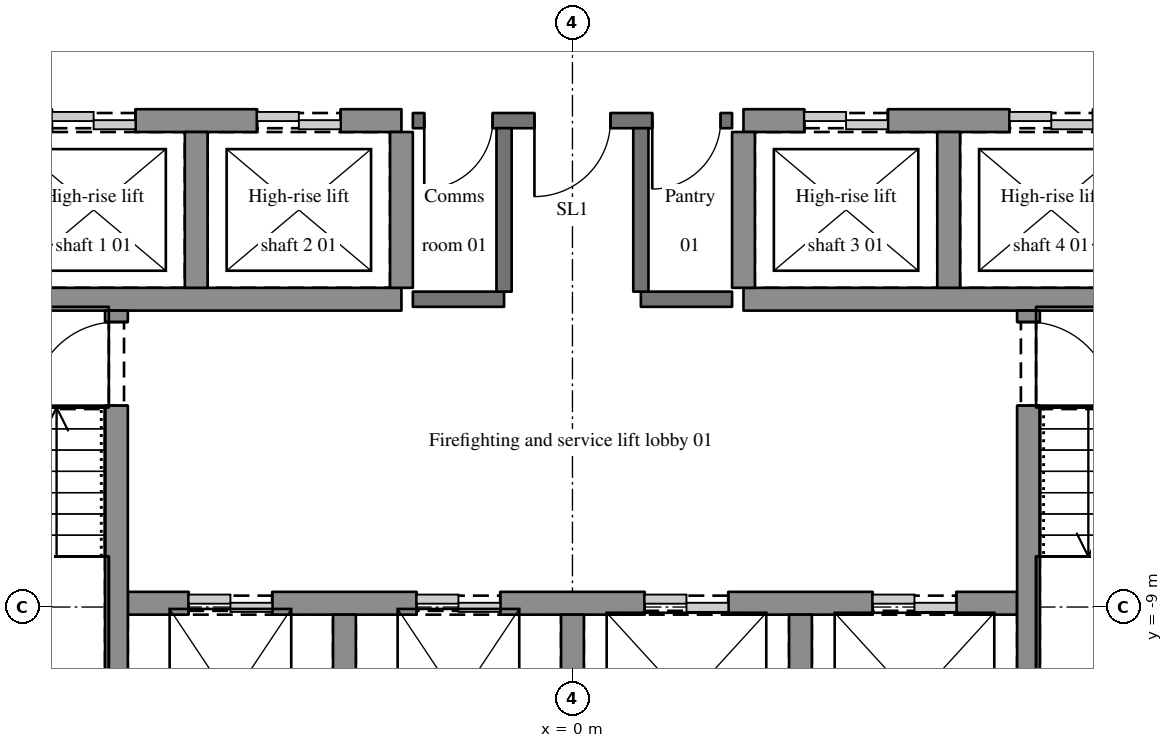
"""IFC4 building model, lengths in metres.
Left out: names, types, materials, properties, quantities, classifications, styles, units other than length and angle.
Written with IfcOpenShell. Run it as: python <this file> out.ifc"""

import sys

from ifc_helpers import new_model, si_unit, direction, frame, frame_2d, origin, place, context, subcontext, project, spatial, rectangle, extrude, element, fill, save


model = new_model("IFC4")
c1 = context("Model", 3, precision=1e-05, world=origin(), true_north=direction((0.0, 1.0)))
c2 = subcontext(c1, "Body", "Model", "MODEL_VIEW")
j1 = project(units=[si_unit("LENGTHUNIT", "METRE"), si_unit("PLANEANGLEUNIT", "RADIAN")], contexts=[c1])
p1 = place(None, origin())
s1 = spatial("IfcSite", under=j1, at=p1, CompositionType="ELEMENT")
p2 = place(p1, origin())
s2 = spatial("IfcBuilding", under=s1, at=p2, CompositionType="ELEMENT")
p3 = place(p2, frame((0.0, 0.0, 162.3)))
s3 = spatial("IfcBuildingStorey", under=s2, at=p3, CompositionType="ELEMENT", Elevation=162.3)
p4 = place(p3, frame((-5.85, -8.95, 0.0), z_axis=(0.0, 0.0, 1.0), x_axis=(1.0, 0.0, 0.0)))
e1 = element("IfcWall", 1, at=p4, inside=s3, PredefinedType="SHEAR", context=c2, shape_type="SweptSolid", body=[
    extrude(rectangle(XDim=11.7, YDim=0.3, at=frame_2d((5.85, 0.0))), origin(), (0.0, 0.0, 1.0), 5.4),
])
p5 = place(p4, frame((0.8, 0.0, 0.0)))
e2 = element("IfcOpeningElement", 2, at=p5, cuts=e1, PredefinedType="OPENING", context=c2, shape_type="SweptSolid", body=[
    extrude(rectangle(XDim=1.1, YDim=2.1, at=frame_2d((0.55, 1.05))), frame((0.0, 0.16, 0.0), z_axis=(0.0, -1.0, 0.0), x_axis=(1.0, 0.0, 0.0)), (0.0, 0.0, 1.0), 0.32),
])
p6 = place(p4, frame((3.8, 0.0, 0.0)))
e3 = element("IfcOpeningElement", 3, at=p6, cuts=e1, PredefinedType="OPENING", context=c2, shape_type="SweptSolid", body=[
    extrude(rectangle(XDim=1.1, YDim=2.1, at=frame_2d((0.55, 1.05))), frame((0.0, 0.16, 0.0), z_axis=(0.0, -1.0, 0.0), x_axis=(1.0, 0.0, 0.0)), (0.0, 0.0, 1.0), 0.32),
])
p7 = place(p4, frame((6.8, 0.0, 0.0)))
e4 = element("IfcOpeningElement", 4, at=p7, cuts=e1, PredefinedType="OPENING", context=c2, shape_type="SweptSolid", body=[
    extrude(rectangle(XDim=1.1, YDim=2.1, at=frame_2d((0.55, 1.05))), frame((0.0, 0.16, 0.0), z_axis=(0.0, -1.0, 0.0), x_axis=(1.0, 0.0, 0.0)), (0.0, 0.0, 1.0), 0.32),
])
p8 = place(p4, frame((9.8, 0.0, 0.0)))
e5 = element("IfcOpeningElement", 5, at=p8, cuts=e1, PredefinedType="OPENING", context=c2, shape_type="SweptSolid", body=[
    extrude(rectangle(XDim=1.1, YDim=2.1, at=frame_2d((0.55, 1.05))), frame((0.0, 0.16, 0.0), z_axis=(0.0, -1.0, 0.0), x_axis=(1.0, 0.0, 0.0)), (0.0, 0.0, 1.0), 0.32),
])
p9 = place(p3, frame((-9.0, -4.95, 0.0), z_axis=(0.0, 0.0, 1.0), x_axis=(1.0, 0.0, 0.0)))
e6 = element("IfcWall", 6, at=p9, inside=s3, PredefinedType="SHEAR", context=c2, shape_type="SweptSolid", body=[
    extrude(rectangle(XDim=6.75, YDim=0.3, at=frame_2d((3.375, 0.0))), origin(), (0.0, 0.0, 1.0), 5.4),
])
for number, where, z_axis, x_axis in (
    (7, (-2.1, -4.95, 0.0), (0.0, 0.0, 1.0), (1.0, 0.0, 0.0)),
    (8, (0.9, -4.95, 0.0), (0.0, 0.0, 1.0), (1.0, 0.0, 0.0)),
):
    element("IfcWall", number, at=place(p3, frame(where, z_axis=z_axis, x_axis=x_axis)), inside=s3, PredefinedType="SOLIDWALL", context=c2, shape_type="SweptSolid", body=[
        extrude(rectangle(XDim=1.2, YDim=0.2, at=frame_2d((0.6, 0.0))), origin(), (0.0, 0.0, 1.0), 5.1),
    ])
p10 = place(p3, frame((2.25, -4.95, 0.0), z_axis=(0.0, 0.0, 1.0), x_axis=(1.0, 0.0, 0.0)))
e9 = element("IfcWall", 9, at=p10, inside=s3, PredefinedType="SHEAR", context=c2, shape_type="SweptSolid", body=[
    extrude(rectangle(XDim=6.75, YDim=0.3, at=frame_2d((3.375, 0.0))), origin(), (0.0, 0.0, 1.0), 5.4),
])
p11 = place(p3, frame((-7.65, -2.6, 0.0), z_axis=(0.0, 0.0, 1.0), x_axis=(1.0, 0.0, 0.0)))
e10 = element("IfcWall", 10, at=p11, inside=s3, PredefinedType="SHEAR", context=c2, shape_type="SweptSolid", body=[
    extrude(rectangle(XDim=5.4, YDim=0.3, at=frame_2d((2.7, 0.0))), origin(), (0.0, 0.0, 1.0), 5.4),
])
p12 = place(p11, frame((0.8, 0.0, 0.0)))
e11 = element("IfcOpeningElement", 11, at=p12, cuts=e10, PredefinedType="OPENING", context=c2, shape_type="SweptSolid", body=[
    extrude(rectangle(XDim=1.1, YDim=2.1, at=frame_2d((0.55, 1.05))), frame((0.0, 0.16, 0.0), z_axis=(0.0, -1.0, 0.0), x_axis=(1.0, 0.0, 0.0)), (0.0, 0.0, 1.0), 0.32),
])
p13 = place(p11, frame((3.5, 0.0, 0.0)))
e12 = element("IfcOpeningElement", 12, at=p13, cuts=e10, PredefinedType="OPENING", context=c2, shape_type="SweptSolid", body=[
    extrude(rectangle(XDim=1.1, YDim=2.1, at=frame_2d((0.55, 1.05))), frame((0.0, 0.16, 0.0), z_axis=(0.0, -1.0, 0.0), x_axis=(1.0, 0.0, 0.0)), (0.0, 0.0, 1.0), 0.32),
])
p14 = place(p3, frame((2.1, -2.6, 0.0), z_axis=(0.0, 0.0, 1.0), x_axis=(-1.0, 0.0, 0.0)))
e13 = element("IfcWall", 13, at=p14, inside=s3, PredefinedType="SOLIDWALL", context=c2, shape_type="SweptSolid", body=[
    extrude(rectangle(XDim=4.2, YDim=0.2, at=frame_2d((2.1, 0.0))), origin(), (0.0, 0.0, 1.0), 5.1),
])
p15 = place(p14, frame((1.6, 0.0, 0.0)))
e14 = element("IfcOpeningElement", 14, at=p15, cuts=e13, PredefinedType="OPENING", context=c2, shape_type="SweptSolid", body=[
    extrude(rectangle(XDim=1.0, YDim=2.1, at=frame_2d((0.5, 1.05))), frame((0.0, 0.11, 0.0), z_axis=(0.0, -1.0, 0.0), x_axis=(1.0, 0.0, 0.0)), (0.0, 0.0, 1.0), 0.22),
])
p16 = place(p14, frame((3.15, 0.0, 0.0)))
e15 = element("IfcOpeningElement", 15, at=p16, cuts=e13, PredefinedType="OPENING", context=c2, shape_type="SweptSolid", body=[
    extrude(rectangle(XDim=0.9, YDim=2.1, at=frame_2d((0.45, 1.05))), frame((0.0, 0.11, 0.0), z_axis=(0.0, -1.0, 0.0), x_axis=(1.0, 0.0, 0.0)), (0.0, 0.0, 1.0), 0.22),
])
p17 = place(p14, frame((0.15, 0.0, 0.0)))
e16 = element("IfcOpeningElement", 16, at=p17, cuts=e13, PredefinedType="OPENING", context=c2, shape_type="SweptSolid", body=[
    extrude(rectangle(XDim=0.9, YDim=2.1, at=frame_2d((0.45, 1.05))), frame((0.0, 0.11, 0.0), z_axis=(0.0, -1.0, 0.0), x_axis=(1.0, 0.0, 0.0)), (0.0, 0.0, 1.0), 0.22),
])
p18 = place(p3, frame((2.25, -2.6, 0.0), z_axis=(0.0, 0.0, 1.0), x_axis=(1.0, 0.0, 0.0)))
e17 = element("IfcWall", 17, at=p18, inside=s3, PredefinedType="SHEAR", context=c2, shape_type="SweptSolid", body=[
    extrude(rectangle(XDim=5.4, YDim=0.3, at=frame_2d((2.7, 0.0))), origin(), (0.0, 0.0, 1.0), 5.4),
])
p19 = place(p18, frame((0.8, 0.0, 0.0)))
e18 = element("IfcOpeningElement", 18, at=p19, cuts=e17, PredefinedType="OPENING", context=c2, shape_type="SweptSolid", body=[
    extrude(rectangle(XDim=1.1, YDim=2.1, at=frame_2d((0.55, 1.05))), frame((0.0, 0.16, 0.0), z_axis=(0.0, -1.0, 0.0), x_axis=(1.0, 0.0, 0.0)), (0.0, 0.0, 1.0), 0.32),
])
p20 = place(p18, frame((3.5, 0.0, 0.0)))
e19 = element("IfcOpeningElement", 19, at=p20, cuts=e17, PredefinedType="OPENING", context=c2, shape_type="SweptSolid", body=[
    extrude(rectangle(XDim=1.1, YDim=2.1, at=frame_2d((0.55, 1.05))), frame((0.0, 0.16, 0.0), z_axis=(0.0, -1.0, 0.0), x_axis=(1.0, 0.0, 0.0)), (0.0, 0.0, 1.0), 0.32),
])
p21 = place(p3, frame((-6.0, -11.5, 0.0), z_axis=(0.0, 0.0, 1.0), x_axis=(0.0, 1.0, 0.0)))
e20 = element("IfcWall", 20, at=p21, inside=s3, PredefinedType="SHEAR", context=c2, shape_type="SweptSolid", body=[
    extrude(rectangle(XDim=6.4, YDim=0.3, at=frame_2d((3.2, 0.0))), origin(), (0.0, 0.0, 1.0), 5.4),
])
p22 = place(p21, frame((5.15, 0.0, 0.0)))
e21 = element("IfcOpeningElement", 21, at=p22, cuts=e20, PredefinedType="OPENING", context=c2, shape_type="SweptSolid", body=[
    extrude(rectangle(XDim=1.1, YDim=2.1, at=frame_2d((0.55, 1.05))), frame((0.0, 0.16, 0.0), z_axis=(0.0, -1.0, 0.0), x_axis=(1.0, 0.0, 0.0)), (0.0, 0.0, 1.0), 0.32),
])
p23 = place(p3, frame((-4.95, -4.8, 0.0), z_axis=(0.0, 0.0, 1.0), x_axis=(0.0, 1.0, 0.0)))
e22 = element("IfcWall", 22, at=p23, inside=s3, PredefinedType="SHEAR", context=c2, shape_type="SweptSolid", body=[
    extrude(rectangle(XDim=2.05, YDim=0.3, at=frame_2d((1.025, 0.0))), origin(), (0.0, 0.0, 1.0), 5.4),
])
p24 = place(p3, frame((-3.0, -11.5, 0.0), z_axis=(0.0, 0.0, 1.0), x_axis=(0.0, 1.0, 0.0)))
e23 = element("IfcWall", 23, at=p24, inside=s3, PredefinedType="SHEAR", context=c2, shape_type="SweptSolid", body=[
    extrude(rectangle(XDim=2.4, YDim=0.3, at=frame_2d((1.2, 0.0))), origin(), (0.0, 0.0, 1.0), 5.4),
])
p25 = place(p3, frame((-2.25, -4.8, 0.0), z_axis=(0.0, 0.0, 1.0), x_axis=(0.0, 1.0, 0.0)))
e24 = element("IfcWall", 24, at=p25, inside=s3, PredefinedType="SHEAR", context=c2, shape_type="SweptSolid", body=[
    extrude(rectangle(XDim=2.05, YDim=0.3, at=frame_2d((1.025, 0.0))), origin(), (0.0, 0.0, 1.0), 5.4),
])
p26 = place(p3, frame((-0.9, -4.85, 0.0), z_axis=(0.0, 0.0, 1.0), x_axis=(0.0, 1.0, 0.0)))
e25 = element("IfcWall", 25, at=p26, inside=s3, PredefinedType="SOLIDWALL", context=c2, shape_type="SweptSolid", body=[
    extrude(rectangle(XDim=2.15, YDim=0.2, at=frame_2d((1.075, 0.0))), origin(), (0.0, 0.0, 1.0), 5.1),
])
p27 = place(p3, frame((0.0, -11.5, 0.0), z_axis=(0.0, 0.0, 1.0), x_axis=(0.0, 1.0, 0.0)))
e26 = element("IfcWall", 26, at=p27, inside=s3, PredefinedType="SHEAR", context=c2, shape_type="SweptSolid", body=[
    extrude(rectangle(XDim=2.4, YDim=0.3, at=frame_2d((1.2, 0.0))), origin(), (0.0, 0.0, 1.0), 5.4),
])
p28 = place(p3, frame((0.9, -4.85, 0.0), z_axis=(0.0, 0.0, 1.0), x_axis=(0.0, 1.0, 0.0)))
e27 = element("IfcWall", 27, at=p28, inside=s3, PredefinedType="SOLIDWALL", context=c2, shape_type="SweptSolid", body=[
    extrude(rectangle(XDim=2.15, YDim=0.2, at=frame_2d((1.075, 0.0))), origin(), (0.0, 0.0, 1.0), 5.1),
])
p29 = place(p3, frame((2.25, -4.8, 0.0), z_axis=(0.0, 0.0, 1.0), x_axis=(0.0, 1.0, 0.0)))
e28 = element("IfcWall", 28, at=p29, inside=s3, PredefinedType="SHEAR", context=c2, shape_type="SweptSolid", body=[
    extrude(rectangle(XDim=2.05, YDim=0.3, at=frame_2d((1.025, 0.0))), origin(), (0.0, 0.0, 1.0), 5.4),
])
p30 = place(p3, frame((3.0, -11.5, 0.0), z_axis=(0.0, 0.0, 1.0), x_axis=(0.0, 1.0, 0.0)))
e29 = element("IfcWall", 29, at=p30, inside=s3, PredefinedType="SHEAR", context=c2, shape_type="SweptSolid", body=[
    extrude(rectangle(XDim=2.4, YDim=0.3, at=frame_2d((1.2, 0.0))), origin(), (0.0, 0.0, 1.0), 5.4),
])
p31 = place(p3, frame((4.95, -4.8, 0.0), z_axis=(0.0, 0.0, 1.0), x_axis=(0.0, 1.0, 0.0)))
e30 = element("IfcWall", 30, at=p31, inside=s3, PredefinedType="SHEAR", context=c2, shape_type="SweptSolid", body=[
    extrude(rectangle(XDim=2.05, YDim=0.3, at=frame_2d((1.025, 0.0))), origin(), (0.0, 0.0, 1.0), 5.4),
])
p32 = place(p3, frame((6.0, -5.1, 0.0), z_axis=(0.0, 0.0, 1.0), x_axis=(0.0, -1.0, 0.0)))
e31 = element("IfcWall", 31, at=p32, inside=s3, PredefinedType="SHEAR", context=c2, shape_type="SweptSolid", body=[
    extrude(rectangle(XDim=6.4, YDim=0.3, at=frame_2d((3.2, 0.0))), origin(), (0.0, 0.0, 1.0), 5.4),
])
p33 = place(p32, frame((0.15, 0.0, 0.0)))
e32 = element("IfcOpeningElement", 32, at=p33, cuts=e31, PredefinedType="OPENING", context=c2, shape_type="SweptSolid", body=[
    extrude(rectangle(XDim=1.1, YDim=2.1, at=frame_2d((0.55, 1.05))), frame((0.0, 0.16, 0.0), z_axis=(0.0, -1.0, 0.0), x_axis=(1.0, 0.0, 0.0)), (0.0, 0.0, 1.0), 0.32),
])
p34 = place(p15, origin())
e33 = element("IfcDoor", 33, at=p34, inside=s3, OperationType="SINGLE_SWING_RIGHT", PredefinedType="DOOR", context=c2, shape_type="SweptSolid", body=[
    extrude(rectangle(XDim=1.0, YDim=2.1, at=frame_2d((0.5, 1.05))), frame((0.0, 0.025, 0.0), z_axis=(0.0, -1.0, 0.0), x_axis=(1.0, 0.0, 0.0)), (0.0, 0.0, 1.0), 0.05),
])
fill(e14, e33)
p35 = place(p22, origin())
e34 = element("IfcDoor", 34, at=p35, inside=s3, OperationType="SINGLE_SWING_LEFT", PredefinedType="DOOR", context=c2, shape_type="SweptSolid", body=[
    extrude(rectangle(XDim=1.1, YDim=2.1, at=frame_2d((0.55, 1.05))), frame((0.0, 0.025, 0.0), z_axis=(0.0, -1.0, 0.0), x_axis=(1.0, 0.0, 0.0)), (0.0, 0.0, 1.0), 0.05),
])
fill(e21, e34)
p36 = place(p33, origin())
e35 = element("IfcDoor", 35, at=p36, inside=s3, OperationType="SINGLE_SWING_RIGHT", PredefinedType="DOOR", context=c2, shape_type="SweptSolid", body=[
    extrude(rectangle(XDim=1.1, YDim=2.1, at=frame_2d((0.55, 1.05))), frame((0.0, 0.025, 0.0), z_axis=(0.0, -1.0, 0.0), x_axis=(1.0, 0.0, 0.0)), (0.0, 0.0, 1.0), 0.05),
])
fill(e32, e35)
p37 = place(p16, origin())
e36 = element("IfcDoor", 36, at=p37, inside=s3, OperationType="SINGLE_SWING_RIGHT", PredefinedType="DOOR", context=c2, shape_type="SweptSolid", body=[
    extrude(rectangle(XDim=0.9, YDim=2.1, at=frame_2d((0.45, 1.05))), frame((0.0, 0.025, 0.0), z_axis=(0.0, -1.0, 0.0), x_axis=(1.0, 0.0, 0.0)), (0.0, 0.0, 1.0), 0.05),
])
fill(e15, e36)
p38 = place(p17, origin())
e37 = element("IfcDoor", 37, at=p38, inside=s3, OperationType="SINGLE_SWING_RIGHT", PredefinedType="DOOR", context=c2, shape_type="SweptSolid", body=[
    extrude(rectangle(XDim=0.9, YDim=2.1, at=frame_2d((0.45, 1.05))), frame((0.0, 0.025, 0.0), z_axis=(0.0, -1.0, 0.0), x_axis=(1.0, 0.0, 0.0)), (0.0, 0.0, 1.0), 0.05),
])
fill(e16, e37)
p39 = place(p5, origin())
e38 = element("IfcDoor", 38, at=p39, inside=s3, OperationType="DOUBLE_DOOR_SLIDING", PredefinedType="DOOR", context=c2, shape_type="SweptSolid", body=[
    extrude(rectangle(XDim=1.1, YDim=2.1, at=frame_2d((0.55, 1.05))), frame((0.0, 0.025, 0.0), z_axis=(0.0, -1.0, 0.0), x_axis=(1.0, 0.0, 0.0)), (0.0, 0.0, 1.0), 0.05),
])
fill(e2, e38)
p40 = place(p6, origin())
e39 = element("IfcDoor", 39, at=p40, inside=s3, OperationType="DOUBLE_DOOR_SLIDING", PredefinedType="DOOR", context=c2, shape_type="SweptSolid", body=[
    extrude(rectangle(XDim=1.1, YDim=2.1, at=frame_2d((0.55, 1.05))), frame((0.0, 0.025, 0.0), z_axis=(0.0, -1.0, 0.0), x_axis=(1.0, 0.0, 0.0)), (0.0, 0.0, 1.0), 0.05),
])
fill(e3, e39)
p41 = place(p12, origin())
e40 = element("IfcDoor", 40, at=p41, inside=s3, OperationType="DOUBLE_DOOR_SLIDING", PredefinedType="DOOR", context=c2, shape_type="SweptSolid", body=[
    extrude(rectangle(XDim=1.1, YDim=2.1, at=frame_2d((0.55, 1.05))), frame((0.0, 0.025, 0.0), z_axis=(0.0, -1.0, 0.0), x_axis=(1.0, 0.0, 0.0)), (0.0, 0.0, 1.0), 0.05),
])
fill(e11, e40)
p42 = place(p13, origin())
e41 = element("IfcDoor", 41, at=p42, inside=s3, OperationType="DOUBLE_DOOR_SLIDING", PredefinedType="DOOR", context=c2, shape_type="SweptSolid", body=[
    extrude(rectangle(XDim=1.1, YDim=2.1, at=frame_2d((0.55, 1.05))), frame((0.0, 0.025, 0.0), z_axis=(0.0, -1.0, 0.0), x_axis=(1.0, 0.0, 0.0)), (0.0, 0.0, 1.0), 0.05),
])
fill(e12, e41)
p43 = place(p19, origin())
e42 = element("IfcDoor", 42, at=p43, inside=s3, OperationType="DOUBLE_DOOR_SLIDING", PredefinedType="DOOR", context=c2, shape_type="SweptSolid", body=[
    extrude(rectangle(XDim=1.1, YDim=2.1, at=frame_2d((0.55, 1.05))), frame((0.0, 0.025, 0.0), z_axis=(0.0, -1.0, 0.0), x_axis=(1.0, 0.0, 0.0)), (0.0, 0.0, 1.0), 0.05),
])
fill(e18, e42)
p44 = place(p20, origin())
e43 = element("IfcDoor", 43, at=p44, inside=s3, OperationType="DOUBLE_DOOR_SLIDING", PredefinedType="DOOR", context=c2, shape_type="SweptSolid", body=[
    extrude(rectangle(XDim=1.1, YDim=2.1, at=frame_2d((0.55, 1.05))), frame((0.0, 0.025, 0.0), z_axis=(0.0, -1.0, 0.0), x_axis=(1.0, 0.0, 0.0)), (0.0, 0.0, 1.0), 0.05),
])
fill(e19, e43)
p45 = place(p7, origin())
e44 = element("IfcDoor", 44, at=p45, inside=s3, OperationType="DOUBLE_DOOR_SLIDING", PredefinedType="DOOR", context=c2, shape_type="SweptSolid", body=[
    extrude(rectangle(XDim=1.1, YDim=2.1, at=frame_2d((0.55, 1.05))), frame((0.0, 0.025, 0.0), z_axis=(0.0, -1.0, 0.0), x_axis=(1.0, 0.0, 0.0)), (0.0, 0.0, 1.0), 0.05),
])
fill(e4, e44)
p46 = place(p8, origin())
e45 = element("IfcDoor", 45, at=p46, inside=s3, OperationType="DOUBLE_DOOR_SLIDING", PredefinedType="DOOR", context=c2, shape_type="SweptSolid", body=[
    extrude(rectangle(XDim=1.1, YDim=2.1, at=frame_2d((0.55, 1.05))), frame((0.0, 0.025, 0.0), z_axis=(0.0, -1.0, 0.0), x_axis=(1.0, 0.0, 0.0)), (0.0, 0.0, 1.0), 0.05),
])
fill(e5, e45)
save(model, sys.argv[1])
